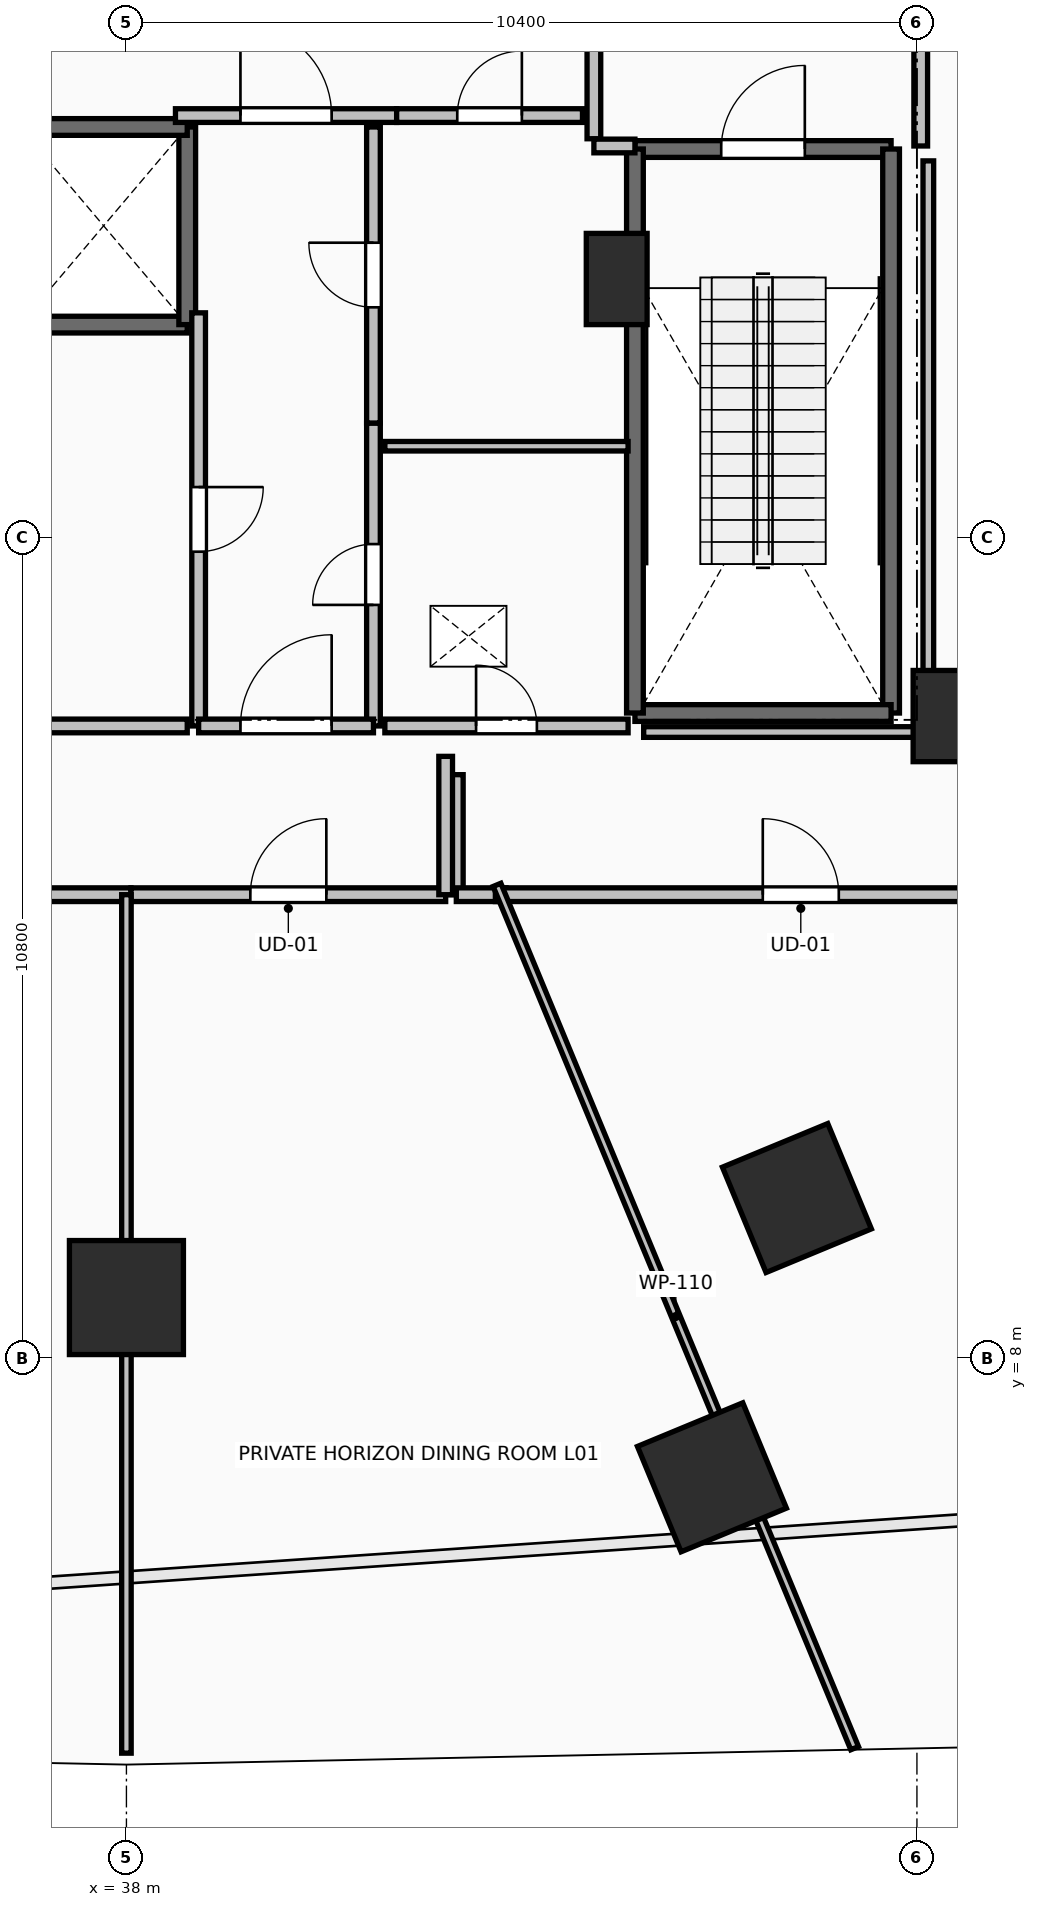
"""IFC4 building model, lengths in metres.
Left out: names, types, materials, properties, quantities, classifications, styles, units other than length and angle.
Written with IfcOpenShell. Run it as: python <this file> out.ifc"""

import sys

from ifc_helpers import new_model, si_unit, direction, frame, frame_2d, origin, origin_2d, place, context, subcontext, project, spatial, rectangle, extrude, element, fill, save


model = new_model("IFC4")
c1 = context("Model", 3, precision=1e-05, world=origin(), true_north=direction((0.0, 1.0)))
c2 = subcontext(c1, "Body", "Model", "MODEL_VIEW")
j1 = project(units=[si_unit("LENGTHUNIT", "METRE"), si_unit("PLANEANGLEUNIT", "RADIAN")], contexts=[c1])
p1 = place(None, origin())
s1 = spatial("IfcSite", under=j1, at=p1, CompositionType="ELEMENT")
p2 = place(p1, origin())
s2 = spatial("IfcBuilding", under=s1, at=p2, CompositionType="ELEMENT")
p3 = place(p2, frame((0.0, 0.0, 4.8)))
s3 = spatial("IfcBuildingStorey", under=s2, at=p3, CompositionType="ELEMENT", Elevation=4.8)
for number, where, z_axis, x_axis in (
    (1, (38.0, 8.8, 0.0), (0.0, 0.0, 1.0), (0.0, -1.0, 0.0)),
    (2, (46.821, 10.109, 0.0), (0.0, 0.0, 1.0), (0.383, -0.924, 0.0)),
    (3, (45.703, 6.435, 0.0), (0.0, 0.0, 1.0), (0.383, -0.924, 0.0)),
):
    element("IfcColumn", number, at=place(p3, frame(where, z_axis=z_axis, x_axis=x_axis)), inside=s3, PredefinedType="COLUMN", context=c2, shape_type="SweptSolid", body=[
        extrude(rectangle(XDim=1.5, YDim=1.5, at=origin_2d()), origin(), (0.0, 0.0, 1.0), 4.8),
    ])
for number, where, z_axis, x_axis in (
    (4, (48.75, 16.45, 0.0), (0.0, 0.0, 1.0), (1.0, 0.0, 0.0)),
    (5, (44.45, 22.2, 0.0), (0.0, 0.0, 1.0), (1.0, 0.0, 0.0)),
):
    element("IfcColumn", number, at=place(p3, frame(where, z_axis=z_axis, x_axis=x_axis)), inside=s3, PredefinedType="PILASTER", context=c2, shape_type="SweptSolid", body=[
        extrude(rectangle(XDim=0.8, YDim=1.2, at=origin_2d()), origin(), (0.0, 0.0, 1.0), 4.8),
    ])
p4 = place(p3, frame((44.69, 23.91, 0.0), z_axis=(0.0, 0.0, 1.0), x_axis=(1.0, 0.0, 0.0)))
e6 = element("IfcWall", 6, at=p4, inside=s3, PredefinedType="SOLIDWALL", context=c2, shape_type="SweptSolid", body=[
    extrude(rectangle(XDim=3.37, YDim=0.22, at=frame_2d((1.685, 0.0))), origin(), (0.0, 0.0, 1.0), 4.48),
])
p5 = place(p4, frame((1.135, 0.0, 0.0)))
e7 = element("IfcOpeningElement", 7, at=p5, cuts=e6, PredefinedType="OPENING", context=c2, shape_type="SweptSolid", body=[
    extrude(rectangle(XDim=1.1, YDim=2.15, at=frame_2d((0.55, 1.075))), frame((0.0, 0.125, 0.0), z_axis=(0.0, -1.0, 0.0), x_axis=(1.0, 0.0, 0.0)), (0.0, 0.0, 1.0), 0.25),
])
p6 = place(p3, frame((48.06, 23.91, 0.0), z_axis=(0.0, 0.0, 1.0), x_axis=(0.0, -1.0, 0.0)))
e8 = element("IfcWall", 8, at=p6, inside=s3, PredefinedType="SOLIDWALL", context=c2, shape_type="SweptSolid", body=[
    extrude(rectangle(XDim=7.42, YDim=0.22, at=frame_2d((3.71, 0.0))), origin(), (0.0, 0.0, 1.0), 4.48),
])
p7 = place(p3, frame((48.06, 16.49, 0.0), z_axis=(0.0, 0.0, 1.0), x_axis=(-1.0, 0.0, 0.0)))
e9 = element("IfcWall", 9, at=p7, inside=s3, PredefinedType="SOLIDWALL", context=c2, shape_type="SweptSolid", body=[
    extrude(rectangle(XDim=3.37, YDim=0.22, at=frame_2d((1.685, 0.0))), origin(), (0.0, 0.0, 1.0), 4.48),
])
p8 = place(p3, frame((44.69, 16.49, 0.0), z_axis=(0.0, 0.0, 1.0), x_axis=(0.0, 1.0, 0.0)))
e10 = element("IfcWall", 10, at=p8, inside=s3, PredefinedType="SOLIDWALL", context=c2, shape_type="SweptSolid", body=[
    extrude(rectangle(XDim=7.42, YDim=0.22, at=frame_2d((3.71, 0.0))), origin(), (0.0, 0.0, 1.0), 4.48),
])
p9 = place(p3, frame((36.6, 21.6, 0.0), z_axis=(0.0, 0.0, 1.0), x_axis=(1.0, 0.0, 0.0)))
e11 = element("IfcWall", 11, at=p9, inside=s3, PredefinedType="SOLIDWALL", context=c2, shape_type="SweptSolid", body=[
    extrude(rectangle(XDim=2.2, YDim=0.22, at=frame_2d((1.1, 0.0))), origin(), (0.0, 0.0, 1.0), 4.48),
])
p10 = place(p3, frame((38.8, 21.6, 0.0), z_axis=(0.0, 0.0, 1.0), x_axis=(0.0, 1.0, 0.0)))
e12 = element("IfcWall", 12, at=p10, inside=s3, PredefinedType="SOLIDWALL", context=c2, shape_type="SweptSolid", body=[
    extrude(rectangle(XDim=2.6, YDim=0.22, at=frame_2d((1.3, 0.0))), origin(), (0.0, 0.0, 1.0), 4.48),
])
p11 = place(p3, frame((38.8, 24.2, 0.0), z_axis=(0.0, 0.0, 1.0), x_axis=(-1.0, 0.0, 0.0)))
e13 = element("IfcWall", 13, at=p11, inside=s3, PredefinedType="SOLIDWALL", context=c2, shape_type="SweptSolid", body=[
    extrude(rectangle(XDim=2.2, YDim=0.22, at=frame_2d((1.1, 0.0))), origin(), (0.0, 0.0, 1.0), 4.48),
])
p12 = place(p3, frame((44.15, 27.955, 0.0), z_axis=(0.0, 0.0, 1.0), x_axis=(0.0, -1.0, 0.0)))
e14 = element("IfcWall", 14, at=p12, inside=s3, PredefinedType="PARTITIONING", context=c2, shape_type="SweptSolid", body=[
    extrude(rectangle(XDim=3.91, YDim=0.18, at=frame_2d((1.955, 0.0))), origin(), (0.0, 0.0, 1.0), 4.48),
])
p13 = place(p12, frame((1.355, 0.0, 0.0)))
e15 = element("IfcOpeningElement", 15, at=p13, cuts=e14, PredefinedType="OPENING", context=c2, shape_type="SweptSolid", body=[
    extrude(rectangle(XDim=1.2, YDim=2.15, at=frame_2d((0.6, 1.075))), frame((0.0, 0.105, 0.0), z_axis=(0.0, -1.0, 0.0), x_axis=(1.0, 0.0, 0.0)), (0.0, 0.0, 1.0), 0.21),
])
p14 = place(p3, frame((44.15, 23.95, 0.0), z_axis=(0.0, 0.0, 1.0), x_axis=(1.0, 0.0, 0.0)))
e16 = element("IfcWall", 16, at=p14, inside=s3, PredefinedType="PARTITIONING", context=c2, shape_type="SweptSolid", body=[
    extrude(rectangle(XDim=0.54, YDim=0.18, at=frame_2d((0.27, 0.0))), origin(), (0.0, 0.0, 1.0), 4.48),
])
p15 = place(p3, frame((48.45, 23.95, 0.0), z_axis=(0.0, 0.0, 1.0), x_axis=(0.0, 1.0, 0.0)))
e17 = element("IfcWall", 17, at=p15, inside=s3, PredefinedType="PARTITIONING", context=c2, shape_type="SweptSolid", body=[
    extrude(rectangle(XDim=4.05, YDim=0.18, at=frame_2d((2.025, 0.0))), origin(), (0.0, 0.0, 1.0), 4.48),
])
p16 = place(p15, frame((1.425, 0.0, 0.0)))
e18 = element("IfcOpeningElement", 18, at=p16, cuts=e17, PredefinedType="OPENING", context=c2, shape_type="SweptSolid", body=[
    extrude(rectangle(XDim=1.2, YDim=2.15, at=frame_2d((0.6, 1.075))), frame((0.0, 0.105, 0.0), z_axis=(0.0, -1.0, 0.0), x_axis=(1.0, 0.0, 0.0)), (0.0, 0.0, 1.0), 0.21),
])
p17 = place(p3, frame((38.645, 24.35, 0.0), z_axis=(0.0, 0.0, 1.0), x_axis=(1.0, 0.0, 0.0)))
e19 = element("IfcWall", 19, at=p17, inside=s3, PredefinedType="PARTITIONING", context=c2, shape_type="SweptSolid", body=[
    extrude(rectangle(XDim=2.91, YDim=0.18, at=frame_2d((1.455, 0.0))), origin(), (0.0, 0.0, 1.0), 4.48),
])
p18 = place(p17, frame((0.855, 0.0, 0.0)))
e20 = element("IfcOpeningElement", 20, at=p18, cuts=e19, PredefinedType="OPENING", context=c2, shape_type="SweptSolid", body=[
    extrude(rectangle(XDim=1.2, YDim=2.15, at=frame_2d((0.6, 1.075))), frame((0.0, 0.105, 0.0), z_axis=(0.0, -1.0, 0.0), x_axis=(1.0, 0.0, 0.0)), (0.0, 0.0, 1.0), 0.21),
])
p19 = place(p3, frame((41.555, 24.35, 0.0), z_axis=(0.0, 0.0, 1.0), x_axis=(1.0, 0.0, 0.0)))
e21 = element("IfcWall", 21, at=p19, inside=s3, PredefinedType="PARTITIONING", context=c2, shape_type="SweptSolid", body=[
    extrude(rectangle(XDim=2.445, YDim=0.18, at=frame_2d((1.223, 0.0))), origin(), (0.0, 0.0, 1.0), 4.48),
])
p20 = place(p19, frame((0.798, 0.0, 0.0)))
e22 = element("IfcOpeningElement", 22, at=p20, cuts=e21, PredefinedType="OPENING", context=c2, shape_type="SweptSolid", body=[
    extrude(rectangle(XDim=0.85, YDim=2.1, at=frame_2d((0.425, 1.05))), frame((0.0, 0.105, 0.0), z_axis=(0.0, -1.0, 0.0), x_axis=(1.0, 0.0, 0.0)), (0.0, 0.0, 1.0), 0.21),
])
p21 = place(p3, frame((41.25, 16.32, 0.0), z_axis=(0.0, 0.0, 1.0), x_axis=(0.0, 1.0, 0.0)))
e23 = element("IfcWall", 23, at=p21, inside=s3, PredefinedType="PARTITIONING", context=c2, shape_type="SweptSolid", body=[
    extrude(rectangle(XDim=3.985, YDim=0.18, at=frame_2d((1.992, 0.0))), origin(), (0.0, 0.0, 1.0), 4.48),
])
p22 = place(p21, frame((1.593, 0.0, 0.0)))
e24 = element("IfcOpeningElement", 24, at=p22, cuts=e23, PredefinedType="OPENING", context=c2, shape_type="SweptSolid", body=[
    extrude(rectangle(XDim=0.8, YDim=2.05, at=frame_2d((0.4, 1.025))), frame((0.0, 0.105, 0.0), z_axis=(0.0, -1.0, 0.0), x_axis=(1.0, 0.0, 0.0)), (0.0, 0.0, 1.0), 0.21),
])
p23 = place(p3, frame((41.25, 20.305, 0.0), z_axis=(0.0, 0.0, 1.0), x_axis=(0.0, 1.0, 0.0)))
e25 = element("IfcWall", 25, at=p23, inside=s3, PredefinedType="PARTITIONING", context=c2, shape_type="SweptSolid", body=[
    extrude(rectangle(XDim=3.895, YDim=0.18, at=frame_2d((1.948, 0.0))), origin(), (0.0, 0.0, 1.0), 4.48),
])
p24 = place(p23, frame((1.522, 0.0, 0.0)))
e26 = element("IfcOpeningElement", 26, at=p24, cuts=e25, PredefinedType="OPENING", context=c2, shape_type="SweptSolid", body=[
    extrude(rectangle(XDim=0.85, YDim=2.1, at=frame_2d((0.425, 1.05))), frame((0.0, 0.105, 0.0), z_axis=(0.0, -1.0, 0.0), x_axis=(1.0, 0.0, 0.0)), (0.0, 0.0, 1.0), 0.21),
])
p25 = place(p3, frame((38.95, 21.755, 0.0), z_axis=(0.0, 0.0, 1.0), x_axis=(0.0, -1.0, 0.0)))
e27 = element("IfcWall", 27, at=p25, inside=s3, PredefinedType="PARTITIONING", context=c2, shape_type="SweptSolid", body=[
    extrude(rectangle(XDim=5.435, YDim=0.18, at=frame_2d((2.717, 0.0))), origin(), (0.0, 0.0, 1.0), 4.48),
])
p26 = place(p25, frame((2.292, 0.0, 0.0)))
e28 = element("IfcOpeningElement", 28, at=p26, cuts=e27, PredefinedType="OPENING", context=c2, shape_type="SweptSolid", body=[
    extrude(rectangle(XDim=0.85, YDim=2.1, at=frame_2d((0.425, 1.05))), frame((0.0, 0.105, 0.0), z_axis=(0.0, -1.0, 0.0), x_axis=(1.0, 0.0, 0.0)), (0.0, 0.0, 1.0), 0.21),
])
p27 = place(p3, frame((38.95, 16.32, 0.0), z_axis=(0.0, 0.0, 1.0), x_axis=(1.0, 0.0, 0.0)))
e29 = element("IfcWall", 29, at=p27, inside=s3, PredefinedType="PARTITIONING", context=c2, shape_type="SweptSolid", body=[
    extrude(rectangle(XDim=2.3, YDim=0.18, at=frame_2d((1.15, 0.0))), origin(), (0.0, 0.0, 1.0), 4.48),
])
p28 = place(p27, frame((0.55, 0.0, 0.0)))
e30 = element("IfcOpeningElement", 30, at=p28, cuts=e29, PredefinedType="OPENING", context=c2, shape_type="SweptSolid", body=[
    extrude(rectangle(XDim=1.2, YDim=2.15, at=frame_2d((0.6, 1.075))), frame((0.0, 0.105, 0.0), z_axis=(0.0, -1.0, 0.0), x_axis=(1.0, 0.0, 0.0)), (0.0, 0.0, 1.0), 0.21),
])
p29 = place(p3, frame((44.6, 20.0, 0.0), z_axis=(0.0, 0.0, 1.0), x_axis=(-1.0, 0.0, 0.0)))
e31 = element("IfcWall", 31, at=p29, inside=s3, PredefinedType="PARTITIONING", context=c2, shape_type="SweptSolid", body=[
    extrude(rectangle(XDim=3.2, YDim=0.125, at=frame_2d((1.6, 0.0))), origin(), (0.0, 0.0, 1.0), 4.48),
])
p30 = place(p3, frame((41.4, 16.32, 0.0), z_axis=(0.0, 0.0, 1.0), x_axis=(1.0, 0.0, 0.0)))
e32 = element("IfcWall", 32, at=p30, inside=s3, PredefinedType="PARTITIONING", context=c2, shape_type="SweptSolid", body=[
    extrude(rectangle(XDim=3.2, YDim=0.18, at=frame_2d((1.6, 0.0))), origin(), (0.0, 0.0, 1.0), 4.48),
])
p31 = place(p30, frame((1.2, 0.0, 0.0)))
e33 = element("IfcOpeningElement", 33, at=p31, cuts=e32, PredefinedType="OPENING", context=c2, shape_type="SweptSolid", body=[
    extrude(rectangle(XDim=0.8, YDim=2.05, at=frame_2d((0.4, 1.025))), frame((0.0, 0.105, 0.0), z_axis=(0.0, -1.0, 0.0), x_axis=(1.0, 0.0, 0.0)), (0.0, 0.0, 1.0), 0.21),
])
p32 = place(p3, frame((31.4, 16.32, 0.0), z_axis=(0.0, 0.0, 1.0), x_axis=(1.0, 0.0, 0.0)))
e34 = element("IfcWall", 34, at=p32, inside=s3, PredefinedType="PARTITIONING", context=c2, shape_type="SweptSolid", body=[
    extrude(rectangle(XDim=7.4, YDim=0.18, at=frame_2d((3.7, 0.0))), origin(), (0.0, 0.0, 1.0), 4.48),
])
p33 = place(p32, frame((3.275, 0.0, 0.0)))
e35 = element("IfcOpeningElement", 35, at=p33, cuts=e34, PredefinedType="OPENING", context=c2, shape_type="SweptSolid", body=[
    extrude(rectangle(XDim=0.85, YDim=2.1, at=frame_2d((0.425, 1.05))), frame((0.0, 0.105, 0.0), z_axis=(0.0, -1.0, 0.0), x_axis=(1.0, 0.0, 0.0)), (0.0, 0.0, 1.0), 0.21),
])
p34 = place(p3, frame((33.131, 14.1, 0.0), z_axis=(0.0, 0.0, 1.0), x_axis=(1.0, 0.0, 0.0)))
e36 = element("IfcWall", 36, at=p34, inside=s3, PredefinedType="PARTITIONING", context=c2, shape_type="SweptSolid", body=[
    extrude(rectangle(XDim=4.929, YDim=0.18, at=frame_2d((2.464, 0.0))), origin(), (0.0, 0.0, 1.0), 4.48),
])
p35 = place(p34, frame((1.965, 0.0, 0.0)))
e37 = element("IfcOpeningElement", 37, at=p35, cuts=e36, PredefinedType="OPENING", context=c2, shape_type="SweptSolid", body=[
    extrude(rectangle(XDim=1.0, YDim=2.15, at=frame_2d((0.5, 1.075))), frame((0.0, 0.105, 0.0), z_axis=(0.0, -1.0, 0.0), x_axis=(1.0, 0.0, 0.0)), (0.0, 0.0, 1.0), 0.21),
])
p36 = place(p3, frame((42.34, 15.679, 0.0), z_axis=(0.0, 0.0, 1.0), x_axis=(0.0, -1.0, 0.0)))
e38 = element("IfcWall", 38, at=p36, inside=s3, PredefinedType="PARTITIONING", context=c2, shape_type="SweptSolid", body=[
    extrude(rectangle(XDim=1.579, YDim=0.18, at=frame_2d((0.79, 0.0))), origin(), (0.0, 0.0, 1.0), 4.48),
])
p37 = place(p3, frame((42.34, 14.1, 0.0), z_axis=(0.0, 0.0, 1.0), x_axis=(1.0, 0.0, 0.0)))
e39 = element("IfcWall", 39, at=p37, inside=s3, PredefinedType="PARTITIONING", context=c2, shape_type="SweptSolid", body=[
    extrude(rectangle(XDim=0.654, YDim=0.18, at=frame_2d((0.327, 0.0))), origin(), (0.0, 0.0, 1.0), 4.48),
])
p38 = place(p3, frame((38.06, 14.1, 0.0), z_axis=(0.0, 0.0, 1.0), x_axis=(1.0, 0.0, 0.0)))
e40 = element("IfcWall", 40, at=p38, inside=s3, PredefinedType="PARTITIONING", context=c2, shape_type="SweptSolid", body=[
    extrude(rectangle(XDim=4.14, YDim=0.18, at=frame_2d((2.07, 0.0))), origin(), (0.0, 0.0, 1.0), 4.48),
])
p39 = place(p38, frame((1.57, 0.0, 0.0)))
e41 = element("IfcOpeningElement", 41, at=p39, cuts=e40, PredefinedType="OPENING", context=c2, shape_type="SweptSolid", body=[
    extrude(rectangle(XDim=1.0, YDim=2.15, at=frame_2d((0.5, 1.075))), frame((0.0, 0.105, 0.0), z_axis=(0.0, -1.0, 0.0), x_axis=(1.0, 0.0, 0.0)), (0.0, 0.0, 1.0), 0.21),
])
p40 = place(p3, frame((42.2, 14.1, 0.0), z_axis=(0.0, 0.0, 1.0), x_axis=(0.0, 1.0, 0.0)))
e42 = element("IfcWall", 42, at=p40, inside=s3, PredefinedType="PARTITIONING", context=c2, shape_type="SweptSolid", body=[
    extrude(rectangle(XDim=1.82, YDim=0.18, at=frame_2d((0.91, 0.0))), origin(), (0.0, 0.0, 1.0), 4.48),
])
p41 = place(p3, frame((42.854, 14.1, 0.0), z_axis=(0.0, 0.0, 1.0), x_axis=(1.0, 0.0, 0.0)))
e43 = element("IfcWall", 43, at=p41, inside=s3, PredefinedType="PARTITIONING", context=c2, shape_type="SweptSolid", body=[
    extrude(rectangle(XDim=8.036, YDim=0.18, at=frame_2d((4.018, 0.0))), origin(), (0.0, 0.0, 1.0), 3.672),
])
p42 = place(p41, frame((3.518, 0.0, 0.0)))
e44 = element("IfcOpeningElement", 44, at=p42, cuts=e43, PredefinedType="OPENING", context=c2, shape_type="SweptSolid", body=[
    extrude(rectangle(XDim=1.0, YDim=2.15, at=frame_2d((0.5, 1.075))), frame((0.0, 0.105, 0.0), z_axis=(0.0, -1.0, 0.0), x_axis=(1.0, 0.0, 0.0)), (0.0, 0.0, 1.0), 0.21),
])
p43 = place(p3, frame((38.0, 2.806, 0.0), z_axis=(0.0, 0.0, 1.0), x_axis=(0.0, 1.0, 0.0)))
e45 = element("IfcWall", 45, at=p43, inside=s3, PredefinedType="PARTITIONING", context=c2, shape_type="SweptSolid", body=[
    extrude(rectangle(XDim=11.294, YDim=0.125, at=frame_2d((5.647, 0.0))), origin(), (0.0, 0.0, 1.0), 3.672),
])
p44 = place(p3, frame((47.581, 2.872, 0.0), z_axis=(0.0, 0.0, 1.0), x_axis=(-0.382723619964, 0.923862885239, 0.0)))
e46 = element("IfcWall", 46, at=p44, inside=s3, PredefinedType="PARTITIONING", context=c2, shape_type="SweptSolid", body=[
    extrude(rectangle(XDim=12.294, YDim=0.11, at=frame_2d((6.147, 0.0))), origin(), (0.0, 0.0, 1.0), 3.672),
])
p45 = place(p3, frame((48.55, 23.754, 0.0), z_axis=(0.0, 0.0, 1.0), x_axis=(0.0, -1.0, 0.0)))
e47 = element("IfcWall", 47, at=p45, inside=s3, PredefinedType="PARTITIONING", context=c2, shape_type="SweptSolid", body=[
    extrude(rectangle(XDim=7.514, YDim=0.14, at=frame_2d((3.757, 0.0))), origin(), (0.0, 0.0, 1.0), 2.406),
])
p46 = place(p3, frame((48.55, 16.24, 0.0), z_axis=(0.0, 0.0, 1.0), x_axis=(-1.0, 0.0, 0.0)))
e48 = element("IfcWall", 48, at=p46, inside=s3, PredefinedType="PARTITIONING", context=c2, shape_type="SweptSolid", body=[
    extrude(rectangle(XDim=3.745, YDim=0.14, at=frame_2d((1.873, 0.0))), origin(), (0.0, 0.0, 1.0), 3.672),
])
p47 = place(p5, origin())
e49 = element("IfcDoor", 49, at=p47, inside=s3, OperationType="SINGLE_SWING_RIGHT", PredefinedType="DOOR", context=c2, shape_type="SweptSolid", body=[
    extrude(rectangle(XDim=1.1, YDim=2.15, at=frame_2d((0.55, 1.075))), frame((0.0, 0.025, 0.0), z_axis=(0.0, -1.0, 0.0), x_axis=(1.0, 0.0, 0.0)), (0.0, 0.0, 1.0), 0.05),
])
fill(e7, e49)
p48 = place(p18, origin())
e50 = element("IfcDoor", 50, at=p48, inside=s3, OperationType="SINGLE_SWING_LEFT", PredefinedType="DOOR", context=c2, shape_type="SweptSolid", body=[
    extrude(rectangle(XDim=1.2, YDim=2.15, at=frame_2d((0.6, 1.075))), frame((0.0, 0.025, 0.0), z_axis=(0.0, -1.0, 0.0), x_axis=(1.0, 0.0, 0.0)), (0.0, 0.0, 1.0), 0.05),
])
fill(e20, e50)
p49 = place(p20, origin())
e51 = element("IfcDoor", 51, at=p49, inside=s3, OperationType="SINGLE_SWING_RIGHT", PredefinedType="DOOR", context=c2, shape_type="SweptSolid", body=[
    extrude(rectangle(XDim=0.85, YDim=2.1, at=frame_2d((0.425, 1.05))), frame((0.0, 0.025, 0.0), z_axis=(0.0, -1.0, 0.0), x_axis=(1.0, 0.0, 0.0)), (0.0, 0.0, 1.0), 0.05),
])
fill(e22, e51)
p50 = place(p22, origin())
e52 = element("IfcDoor", 52, at=p50, inside=s3, OperationType="SINGLE_SWING_LEFT", PredefinedType="DOOR", context=c2, shape_type="SweptSolid", body=[
    extrude(rectangle(XDim=0.8, YDim=2.05, at=frame_2d((0.4, 1.025))), frame((0.0, 0.025, 0.0), z_axis=(0.0, -1.0, 0.0), x_axis=(1.0, 0.0, 0.0)), (0.0, 0.0, 1.0), 0.05),
])
fill(e24, e52)
p51 = place(p24, origin())
e53 = element("IfcDoor", 53, at=p51, inside=s3, OperationType="SINGLE_SWING_RIGHT", PredefinedType="DOOR", context=c2, shape_type="SweptSolid", body=[
    extrude(rectangle(XDim=0.85, YDim=2.1, at=frame_2d((0.425, 1.05))), frame((0.0, 0.025, 0.0), z_axis=(0.0, -1.0, 0.0), x_axis=(1.0, 0.0, 0.0)), (0.0, 0.0, 1.0), 0.05),
])
fill(e26, e53)
p52 = place(p26, origin())
e54 = element("IfcDoor", 54, at=p52, inside=s3, OperationType="SINGLE_SWING_LEFT", PredefinedType="DOOR", context=c2, shape_type="SweptSolid", body=[
    extrude(rectangle(XDim=0.85, YDim=2.1, at=frame_2d((0.425, 1.05))), frame((0.0, 0.025, 0.0), z_axis=(0.0, -1.0, 0.0), x_axis=(1.0, 0.0, 0.0)), (0.0, 0.0, 1.0), 0.05),
])
fill(e28, e54)
p53 = place(p28, origin())
e55 = element("IfcDoor", 55, at=p53, inside=s3, OperationType="SINGLE_SWING_RIGHT", PredefinedType="DOOR", context=c2, shape_type="SweptSolid", body=[
    extrude(rectangle(XDim=1.2, YDim=2.15, at=frame_2d((0.6, 1.075))), frame((0.0, 0.025, 0.0), z_axis=(0.0, -1.0, 0.0), x_axis=(1.0, 0.0, 0.0)), (0.0, 0.0, 1.0), 0.05),
])
fill(e30, e55)
p54 = place(p31, origin())
e56 = element("IfcDoor", 56, at=p54, inside=s3, OperationType="SINGLE_SWING_LEFT", PredefinedType="DOOR", context=c2, shape_type="SweptSolid", body=[
    extrude(rectangle(XDim=0.8, YDim=2.05, at=frame_2d((0.4, 1.025))), frame((0.0, 0.025, 0.0), z_axis=(0.0, -1.0, 0.0), x_axis=(1.0, 0.0, 0.0)), (0.0, 0.0, 1.0), 0.05),
])
fill(e33, e56)
p55 = place(p39, origin())
e57 = element("IfcDoor", 57, at=p55, inside=s3, OperationType="SINGLE_SWING_RIGHT", PredefinedType="DOOR", context=c2, shape_type="SweptSolid", body=[
    extrude(rectangle(XDim=1.0, YDim=2.15, at=frame_2d((0.5, 1.075))), frame((0.0, 0.025, 0.0), z_axis=(0.0, -1.0, 0.0), x_axis=(1.0, 0.0, 0.0)), (0.0, 0.0, 1.0), 0.05),
])
fill(e41, e57)
p56 = place(p42, origin())
e58 = element("IfcDoor", 58, at=p56, inside=s3, OperationType="SINGLE_SWING_LEFT", PredefinedType="DOOR", context=c2, shape_type="SweptSolid", body=[
    extrude(rectangle(XDim=1.0, YDim=2.15, at=frame_2d((0.5, 1.075))), frame((0.0, 0.025, 0.0), z_axis=(0.0, -1.0, 0.0), x_axis=(1.0, 0.0, 0.0)), (0.0, 0.0, 1.0), 0.05),
])
fill(e44, e58)
save(model, sys.argv[1])
